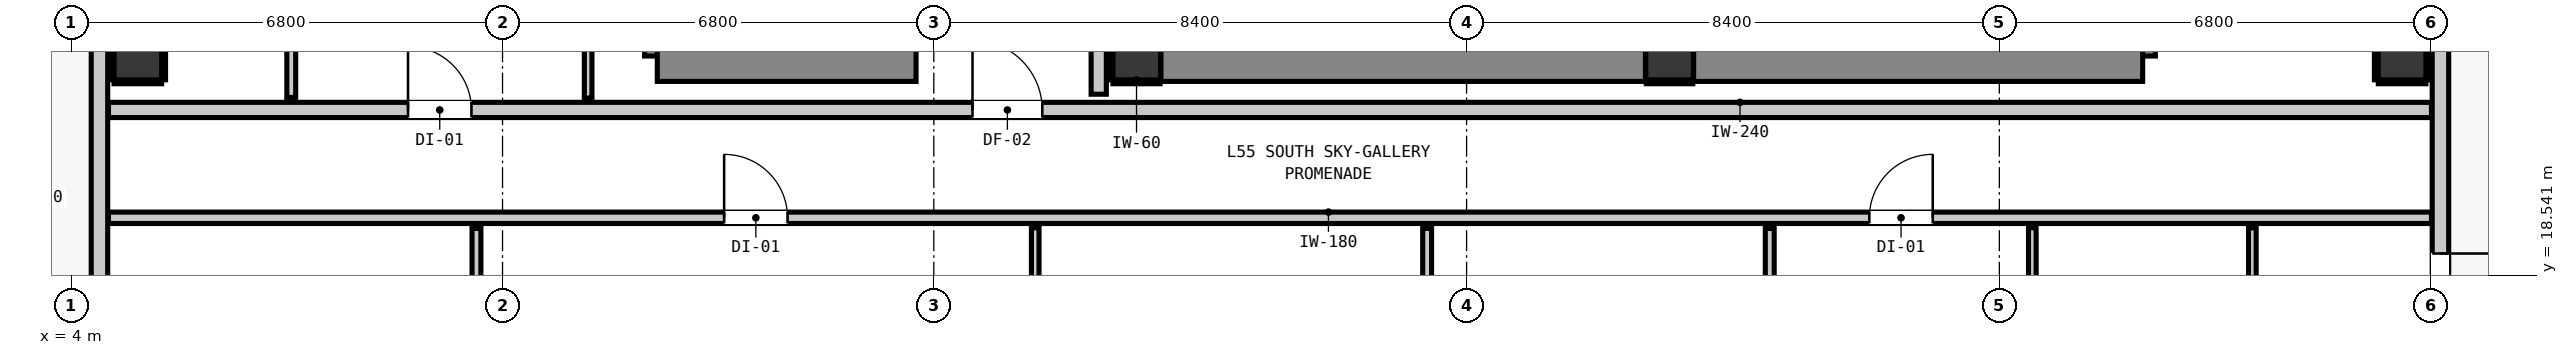
"""IFC4 building model, lengths in metres.
Left out: names, types, materials, properties, quantities, classifications, styles, units other than length and angle.
Written with IfcOpenShell. Run it as: python <this file> out.ifc"""

import sys

from ifc_helpers import new_model, si_unit, direction, frame, frame_2d, origin, origin_2d, place, context, subcontext, project, spatial, rectangle, extrude, element, fill, save


model = new_model("IFC4")
c1 = context("Model", 3, precision=1e-05, world=origin(), true_north=direction((0.0, 1.0)))
c2 = subcontext(c1, "Body", "Model", "MODEL_VIEW")
j1 = project(units=[si_unit("LENGTHUNIT", "METRE"), si_unit("PLANEANGLEUNIT", "RADIAN")], contexts=[c1])
p1 = place(None, origin())
s1 = spatial("IfcSite", under=j1, at=p1, CompositionType="ELEMENT")
p2 = place(p1, origin())
s2 = spatial("IfcBuilding", under=s1, at=p2, CompositionType="ELEMENT")
p3 = place(p2, frame((0.0, 0.0, 190.16)))
s3 = spatial("IfcBuildingStorey", under=s2, at=p3, CompositionType="ELEMENT", Elevation=190.16)
for number, where, z_axis, x_axis in (
    (1, (20.8, 22.0, 0.0), (0.0, 0.0, 1.0), (1.0, 0.0, 0.0)),
    (2, (29.2, 22.0, 0.0), (0.0, 0.0, 1.0), (1.0, 0.0, 0.0)),
):
    element("IfcColumn", number, at=place(p3, frame(where, z_axis=z_axis, x_axis=x_axis)), inside=s3, PredefinedType="COLUMN", context=c2, shape_type="SweptSolid", body=[
        extrude(rectangle(XDim=0.75, YDim=0.75, at=origin_2d()), origin(), (0.0, 0.0, 1.0), 3.32),
    ])
p4 = place(p3, frame((13.44, 22.0, 0.0), z_axis=(0.0, 0.0, 1.0), x_axis=(0.0, 1.0, 0.0)))
e3 = element("IfcWall", 3, at=p4, inside=s3, PredefinedType="SHEAR", context=c2, shape_type="SweptSolid", body=[
    extrude(rectangle(XDim=8.32, YDim=0.8, at=frame_2d((4.16, 0.0))), origin(), (0.0, 0.0, 1.0), 3.32),
])
p5 = place(p3, frame((13.24, 22.0, 0.0), z_axis=(0.0, 0.0, 1.0), x_axis=(1.0, 0.0, 0.0)))
e4 = element("IfcWall", 4, at=p5, inside=s3, PredefinedType="SHEAR", context=c2, shape_type="SweptSolid", body=[
    extrude(rectangle(XDim=4.08, YDim=0.8, at=frame_2d((2.04, 0.0))), origin(), (0.0, 0.0, 1.0), 3.32),
])
p6 = place(p3, frame((36.46, 22.0, 0.0), z_axis=(0.0, 0.0, 1.0), x_axis=(0.0, 1.0, 0.0)))
e5 = element("IfcWall", 5, at=p6, inside=s3, PredefinedType="SHEAR", context=c2, shape_type="SweptSolid", body=[
    extrude(rectangle(XDim=8.32, YDim=0.8, at=frame_2d((4.16, 0.0))), origin(), (0.0, 0.0, 1.0), 3.32),
])
p7 = place(p3, frame((29.58, 22.0, 0.0), z_axis=(0.0, 0.0, 1.0), x_axis=(1.0, 0.0, 0.0)))
e6 = element("IfcWall", 6, at=p7, inside=s3, PredefinedType="SHEAR", context=c2, shape_type="SweptSolid", body=[
    extrude(rectangle(XDim=7.08, YDim=0.8, at=frame_2d((3.54, 0.0))), origin(), (0.0, 0.0, 1.0), 3.32),
])
p8 = place(p3, frame((21.18, 22.0, 0.0), z_axis=(0.0, 0.0, 1.0), x_axis=(1.0, 0.0, 0.0)))
e7 = element("IfcWall", 7, at=p8, inside=s3, PredefinedType="SHEAR", context=c2, shape_type="SweptSolid", body=[
    extrude(rectangle(XDim=7.64, YDim=0.8, at=frame_2d((3.82, 0.0))), origin(), (0.0, 0.0, 1.0), 3.32),
])
for number, where, z_axis, x_axis in (
    (8, (5.05, 22.0, -0.2), (0.0, 0.0, 1.0), (1.0, 0.0, 0.0)),
    (9, (40.75, 22.0, -0.2), (0.0, 0.0, 1.0), (1.0, 0.0, 0.0)),
):
    element("IfcColumn", number, at=place(p3, frame(where, z_axis=z_axis, x_axis=x_axis)), inside=s3, PredefinedType="COLUMN", context=c2, shape_type="SweptSolid", body=[
        extrude(rectangle(XDim=0.75, YDim=0.75, at=origin_2d()), origin(), (0.0, 0.0, 1.0), 3.52),
    ])
p9 = place(p3, frame((4.445, 12.345, 0.0), z_axis=(0.0, 0.0, 1.0), x_axis=(0.0, 1.0, 0.0)))
e10 = element("IfcWall", 10, at=p9, inside=s3, PredefinedType="STANDARD", context=c2, shape_type="SweptSolid", body=[
    extrude(rectangle(XDim=30.31, YDim=0.26, at=frame_2d((15.155, 0.0))), origin(), (0.0, 0.0, 1.0), 3.1),
])
p10 = place(p9, frame((10.728, 0.0, 0.0)))
e11 = element("IfcOpeningElement", 11, at=p10, cuts=e10, PredefinedType="OPENING", context=c2, shape_type="SweptSolid", body=[
    extrude(rectangle(XDim=1.1, YDim=2.15, at=frame_2d((0.55, 1.075))), frame((0.0, 0.14, 0.0), z_axis=(0.0, -1.0, 0.0), x_axis=(1.0, 0.0, 0.0)), (0.0, 0.0, 1.0), 0.28),
])
p11 = place(p9, frame((0.252, 0.0, 0.85)))
e12 = element("IfcOpeningElement", 12, at=p11, cuts=e10, PredefinedType="OPENING", context=c2, shape_type="SweptSolid", body=[
    extrude(rectangle(XDim=2.7, YDim=2.0, at=frame_2d((1.35, 1.0))), frame((0.0, 0.14, 0.0), z_axis=(0.0, -1.0, 0.0), x_axis=(1.0, 0.0, 0.0)), (0.0, 0.0, 1.0), 0.28),
])
p12 = place(p3, frame((41.355, 42.655, 0.0), z_axis=(0.0, 0.0, 1.0), x_axis=(0.0, -1.0, 0.0)))
e13 = element("IfcWall", 13, at=p12, inside=s3, PredefinedType="STANDARD", context=c2, shape_type="SweptSolid", body=[
    extrude(rectangle(XDim=30.31, YDim=0.26, at=frame_2d((15.155, 0.0))), origin(), (0.0, 0.0, 1.0), 3.1),
])
p13 = place(p12, frame((23.768, 0.0, 0.0)))
e14 = element("IfcOpeningElement", 14, at=p13, cuts=e13, PredefinedType="OPENING", context=c2, shape_type="SweptSolid", body=[
    extrude(rectangle(XDim=1.1, YDim=2.15, at=frame_2d((0.55, 1.075))), frame((0.0, 0.14, 0.0), z_axis=(0.0, -1.0, 0.0), x_axis=(1.0, 0.0, 0.0)), (0.0, 0.0, 1.0), 0.28),
])
p14 = place(p12, frame((25.507, 0.0, 0.85)))
e15 = element("IfcOpeningElement", 15, at=p14, cuts=e13, PredefinedType="OPENING", context=c2, shape_type="SweptSolid", body=[
    extrude(rectangle(XDim=1.05, YDim=1.65, at=frame_2d((0.525, 0.825))), frame((0.0, 0.14, 0.0), z_axis=(0.0, -1.0, 0.0), x_axis=(1.0, 0.0, 0.0)), (0.0, 0.0, 1.0), 0.28),
])
p15 = place(p12, frame((27.358, 0.0, 0.85)))
e16 = element("IfcOpeningElement", 16, at=p15, cuts=e13, PredefinedType="OPENING", context=c2, shape_type="SweptSolid", body=[
    extrude(rectangle(XDim=2.7, YDim=2.0, at=frame_2d((1.35, 1.0))), frame((0.0, 0.14, 0.0), z_axis=(0.0, -1.0, 0.0), x_axis=(1.0, 0.0, 0.0)), (0.0, 0.0, 1.0), 0.28),
])
p16 = place(p3, frame((4.587, 21.15, 0.0), z_axis=(0.0, 0.0, 1.0), x_axis=(1.0, 0.0, 0.0)))
e17 = element("IfcWall", 17, at=p16, inside=s3, PredefinedType="PARTITIONING", context=c2, shape_type="SweptSolid", body=[
    extrude(rectangle(XDim=36.626, YDim=0.24, at=frame_2d((18.313, 0.0))), origin(), (0.0, 0.0, 1.0), 3.1),
])
p17 = place(p16, frame((13.623, 0.0, 0.0)))
e18 = element("IfcOpeningElement", 18, at=p17, cuts=e17, PredefinedType="OPENING", context=c2, shape_type="SweptSolid", body=[
    extrude(rectangle(XDim=1.1, YDim=2.15, at=frame_2d((0.55, 1.075))), frame((0.0, 0.13, 0.0), z_axis=(0.0, -1.0, 0.0), x_axis=(1.0, 0.0, 0.0)), (0.0, 0.0, 1.0), 0.26),
])
p18 = place(p16, frame((4.723, 0.0, 0.0)))
e19 = element("IfcOpeningElement", 19, at=p18, cuts=e17, PredefinedType="OPENING", context=c2, shape_type="SweptSolid", body=[
    extrude(rectangle(XDim=1.0, YDim=2.15, at=frame_2d((0.5, 1.075))), frame((0.0, 0.13, 0.0), z_axis=(0.0, -1.0, 0.0), x_axis=(1.0, 0.0, 0.0)), (0.0, 0.0, 1.0), 0.26),
])
p19 = place(p3, frame((4.587, 19.45, 0.0), z_axis=(0.0, 0.0, 1.0), x_axis=(1.0, 0.0, 0.0)))
e20 = element("IfcWall", 20, at=p19, inside=s3, PredefinedType="PARTITIONING", context=c2, shape_type="SweptSolid", body=[
    extrude(rectangle(XDim=36.626, YDim=0.18, at=frame_2d((18.313, 0.0))), origin(), (0.0, 0.0, 1.0), 3.1),
])
p20 = place(p19, frame((9.707, 0.0, 0.0)))
e21 = element("IfcOpeningElement", 21, at=p20, cuts=e20, PredefinedType="OPENING", context=c2, shape_type="SweptSolid", body=[
    extrude(rectangle(XDim=1.0, YDim=2.15, at=frame_2d((0.5, 1.075))), frame((0.0, 0.1, 0.0), z_axis=(0.0, -1.0, 0.0), x_axis=(1.0, 0.0, 0.0)), (0.0, 0.0, 1.0), 0.2),
])
p21 = place(p19, frame((27.763, 0.0, 0.0)))
e22 = element("IfcOpeningElement", 22, at=p21, cuts=e20, PredefinedType="OPENING", context=c2, shape_type="SweptSolid", body=[
    extrude(rectangle(XDim=1.0, YDim=2.15, at=frame_2d((0.5, 1.075))), frame((0.0, 0.1, 0.0), z_axis=(0.0, -1.0, 0.0), x_axis=(1.0, 0.0, 0.0)), (0.0, 0.0, 1.0), 0.2),
])
p22 = place(p3, frame((20.2, 21.398, 0.0), z_axis=(0.0, 0.0, 1.0), x_axis=(0.0, 1.0, 0.0)))
e23 = element("IfcWall", 23, at=p22, inside=s3, PredefinedType="PARTITIONING", context=c2, shape_type="SweptSolid", body=[
    extrude(rectangle(XDim=6.754, YDim=0.24, at=frame_2d((3.377, 0.0))), origin(), (0.0, 0.0, 1.0), 3.1),
])
p23 = place(p3, frame((7.469, 21.348, 0.0), z_axis=(0.0, 0.0, 1.0), x_axis=(0.0, 1.0, 0.0)))
e24 = element("IfcWall", 24, at=p23, inside=s3, PredefinedType="PARTITIONING", context=c2, shape_type="SweptSolid", body=[
    extrude(rectangle(XDim=4.804, YDim=0.14, at=frame_2d((2.402, 0.0))), origin(), (0.0, 0.0, 1.0), 3.1),
])
p24 = place(p23, frame((1.94, 0.0, 0.0)))
e25 = element("IfcOpeningElement", 25, at=p24, cuts=e24, PredefinedType="OPENING", context=c2, shape_type="SweptSolid", body=[
    extrude(rectangle(XDim=0.9, YDim=2.1, at=frame_2d((0.45, 1.05))), frame((0.0, 0.08, 0.0), z_axis=(0.0, -1.0, 0.0), x_axis=(1.0, 0.0, 0.0)), (0.0, 0.0, 1.0), 0.16),
])
p25 = place(p3, frame((10.389, 15.707, 0.0), z_axis=(0.0, 0.0, 1.0), x_axis=(0.0, 1.0, 0.0)))
e26 = element("IfcWall", 26, at=p25, inside=s3, PredefinedType="PARTITIONING", context=c2, shape_type="SweptSolid", body=[
    extrude(rectangle(XDim=3.575, YDim=0.14, at=frame_2d((1.788, 0.0))), origin(), (0.0, 0.0, 1.0), 3.1),
])
p26 = place(p25, frame((1.355, 0.0, 0.0)))
e27 = element("IfcOpeningElement", 27, at=p26, cuts=e26, PredefinedType="OPENING", context=c2, shape_type="SweptSolid", body=[
    extrude(rectangle(XDim=0.86, YDim=2.02, at=frame_2d((0.43, 1.01))), frame((0.0, 0.08, 0.0), z_axis=(0.0, -1.0, 0.0), x_axis=(1.0, 0.0, 0.0)), (0.0, 0.0, 1.0), 0.16),
])
p27 = place(p3, frame((25.378, 15.707, 0.0), z_axis=(0.0, 0.0, 1.0), x_axis=(0.0, 1.0, 0.0)))
e28 = element("IfcWall", 28, at=p27, inside=s3, PredefinedType="PARTITIONING", context=c2, shape_type="SweptSolid", body=[
    extrude(rectangle(XDim=3.575, YDim=0.14, at=frame_2d((1.788, 0.0))), origin(), (0.0, 0.0, 1.0), 3.1),
])
p28 = place(p3, frame((30.78, 15.707, 0.0), z_axis=(0.0, 0.0, 1.0), x_axis=(0.0, 1.0, 0.0)))
e29 = element("IfcWall", 29, at=p28, inside=s3, PredefinedType="PARTITIONING", context=c2, shape_type="SweptSolid", body=[
    extrude(rectangle(XDim=3.575, YDim=0.14, at=frame_2d((1.788, 0.0))), origin(), (0.0, 0.0, 1.0), 3.1),
])
p29 = place(p28, frame((1.355, 0.0, 0.0)))
e30 = element("IfcOpeningElement", 30, at=p29, cuts=e29, PredefinedType="OPENING", context=c2, shape_type="SweptSolid", body=[
    extrude(rectangle(XDim=0.86, YDim=2.02, at=frame_2d((0.43, 1.01))), frame((0.0, 0.08, 0.0), z_axis=(0.0, -1.0, 0.0), x_axis=(1.0, 0.0, 0.0)), (0.0, 0.0, 1.0), 0.16),
])
p30 = place(p3, frame((12.15, 21.338, 0.0), z_axis=(0.0, 0.0, 1.0), x_axis=(0.0, 1.0, 0.0)))
e31 = element("IfcWall", 31, at=p30, inside=s3, PredefinedType="PARTITIONING", context=c2, shape_type="SweptSolid", body=[
    extrude(rectangle(XDim=10.154, YDim=0.12, at=frame_2d((5.077, 0.0))), origin(), (0.0, 0.0, 1.0), 3.1),
])
p31 = place(p3, frame((19.199, 15.697, 0.0), z_axis=(0.0, 0.0, 1.0), x_axis=(0.0, 1.0, 0.0)))
e32 = element("IfcWall", 32, at=p31, inside=s3, PredefinedType="PARTITIONING", context=c2, shape_type="SweptSolid", body=[
    extrude(rectangle(XDim=3.595, YDim=0.12, at=frame_2d((1.797, 0.0))), origin(), (0.0, 0.0, 1.0), 3.1),
])
p32 = place(p31, frame((1.345, 0.0, 0.0)))
e33 = element("IfcOpeningElement", 33, at=p32, cuts=e32, PredefinedType="OPENING", context=c2, shape_type="SweptSolid", body=[
    extrude(rectangle(XDim=0.9, YDim=2.1, at=frame_2d((0.45, 1.05))), frame((0.0, 0.07, 0.0), z_axis=(0.0, -1.0, 0.0), x_axis=(1.0, 0.0, 0.0)), (0.0, 0.0, 1.0), 0.14),
])
p33 = place(p3, frame((34.92, 15.697, 0.0), z_axis=(0.0, 0.0, 1.0), x_axis=(0.0, 1.0, 0.0)))
e34 = element("IfcWall", 34, at=p33, inside=s3, PredefinedType="PARTITIONING", context=c2, shape_type="SweptSolid", body=[
    extrude(rectangle(XDim=3.595, YDim=0.12, at=frame_2d((1.797, 0.0))), origin(), (0.0, 0.0, 1.0), 3.1),
])
p34 = place(p33, frame((1.345, 0.0, 0.0)))
e35 = element("IfcOpeningElement", 35, at=p34, cuts=e34, PredefinedType="OPENING", context=c2, shape_type="SweptSolid", body=[
    extrude(rectangle(XDim=0.9, YDim=2.1, at=frame_2d((0.45, 1.05))), frame((0.0, 0.07, 0.0), z_axis=(0.0, -1.0, 0.0), x_axis=(1.0, 0.0, 0.0)), (0.0, 0.0, 1.0), 0.14),
])
p35 = place(p3, frame((38.389, 15.697, 0.0), z_axis=(0.0, 0.0, 1.0), x_axis=(0.0, 1.0, 0.0)))
e36 = element("IfcWall", 36, at=p35, inside=s3, PredefinedType="PARTITIONING", context=c2, shape_type="SweptSolid", body=[
    extrude(rectangle(XDim=3.595, YDim=0.12, at=frame_2d((1.797, 0.0))), origin(), (0.0, 0.0, 1.0), 2.477),
])
p36 = place(p35, frame((1.358, 0.0, 0.0)))
e37 = element("IfcOpeningElement", 37, at=p36, cuts=e36, PredefinedType="OPENING", context=c2, shape_type="SweptSolid", body=[
    extrude(rectangle(XDim=0.9, YDim=2.1, at=frame_2d((0.45, 1.05))), frame((0.0, 0.07, 0.0), z_axis=(0.0, -1.0, 0.0), x_axis=(1.0, 0.0, 0.0)), (0.0, 0.0, 1.0), 0.14),
])
p37 = place(p3, frame((20.425, 21.593, 0.0), z_axis=(0.0, 0.0, 1.0), x_axis=(1.0, 0.0, 0.0)))
e38 = element("IfcWall", 38, at=p37, inside=s3, PredefinedType="PARTITIONING", context=c2, shape_type="SweptSolid", body=[
    extrude(rectangle(XDim=0.742, YDim=0.06, at=frame_2d((0.371, 0.0))), origin(), (0.0, 0.0, 1.0), 1.45),
])
p38 = place(p3, frame((20.393, 21.625, 0.0), z_axis=(0.0, 0.0, 1.0), x_axis=(0.0, 1.0, 0.0)))
e39 = element("IfcWall", 39, at=p38, inside=s3, PredefinedType="PARTITIONING", context=c2, shape_type="SweptSolid", body=[
    extrude(rectangle(XDim=0.75, YDim=0.06, at=frame_2d((0.375, 0.0))), origin(), (0.0, 0.0, 1.0), 1.45),
])
p39 = place(p3, frame((28.833, 21.593, 0.0), z_axis=(0.0, 0.0, 1.0), x_axis=(1.0, 0.0, 0.0)))
e40 = element("IfcWall", 40, at=p39, inside=s3, PredefinedType="PARTITIONING", context=c2, shape_type="SweptSolid", body=[
    extrude(rectangle(XDim=0.734, YDim=0.06, at=frame_2d((0.367, 0.0))), origin(), (0.0, 0.0, 1.0), 1.45),
])
for number, where, z_axis, x_axis in (
    (41, (4.675, 21.593, 0.0), (0.0, 0.0, 1.0), (1.0, 0.0, 0.0)),
    (42, (4.643, 21.625, 0.0), (0.0, 0.0, 1.0), (0.0, 1.0, 0.0)),
    (43, (5.457, 21.625, 0.0), (0.0, 0.0, 1.0), (0.0, 1.0, 0.0)),
    (44, (40.375, 21.593, 0.0), (0.0, 0.0, 1.0), (1.0, 0.0, 0.0)),
    (45, (40.343, 21.625, 0.0), (0.0, 0.0, 1.0), (0.0, 1.0, 0.0)),
    (46, (41.157, 21.625, 0.0), (0.0, 0.0, 1.0), (0.0, 1.0, 0.0)),
):
    element("IfcWall", number, at=place(p3, frame(where, z_axis=z_axis, x_axis=x_axis)), inside=s3, PredefinedType="PARTITIONING", context=c2, shape_type="SweptSolid", body=[
        extrude(rectangle(XDim=0.75, YDim=0.06, at=frame_2d((0.375, 0.0))), origin(), (0.0, 0.0, 1.0), 1.45),
    ])
p40 = place(p13, origin())
e47 = element("IfcDoor", 47, at=p40, inside=s3, OperationType="SINGLE_SWING_LEFT", PredefinedType="DOOR", context=c2, shape_type="SweptSolid", body=[
    extrude(rectangle(XDim=1.1, YDim=2.15, at=frame_2d((0.55, 1.075))), frame((0.0, 0.025, 0.0), z_axis=(0.0, -1.0, 0.0), x_axis=(1.0, 0.0, 0.0)), (0.0, 0.0, 1.0), 0.05),
])
fill(e14, e47)
p41 = place(p17, origin())
e48 = element("IfcDoor", 48, at=p41, inside=s3, OperationType="SINGLE_SWING_LEFT", PredefinedType="DOOR", context=c2, shape_type="SweptSolid", body=[
    extrude(rectangle(XDim=1.1, YDim=2.15, at=frame_2d((0.55, 1.075))), frame((0.0, 0.025, 0.0), z_axis=(0.0, -1.0, 0.0), x_axis=(1.0, 0.0, 0.0)), (0.0, 0.0, 1.0), 0.05),
])
fill(e18, e48)
p42 = place(p20, origin())
e49 = element("IfcDoor", 49, at=p42, inside=s3, OperationType="SINGLE_SWING_LEFT", PredefinedType="DOOR", context=c2, shape_type="SweptSolid", body=[
    extrude(rectangle(XDim=1.0, YDim=2.15, at=frame_2d((0.5, 1.075))), frame((0.0, 0.025, 0.0), z_axis=(0.0, -1.0, 0.0), x_axis=(1.0, 0.0, 0.0)), (0.0, 0.0, 1.0), 0.05),
])
fill(e21, e49)
p43 = place(p21, origin())
e50 = element("IfcDoor", 50, at=p43, inside=s3, OperationType="SINGLE_SWING_RIGHT", PredefinedType="DOOR", context=c2, shape_type="SweptSolid", body=[
    extrude(rectangle(XDim=1.0, YDim=2.15, at=frame_2d((0.5, 1.075))), frame((0.0, 0.025, 0.0), z_axis=(0.0, -1.0, 0.0), x_axis=(1.0, 0.0, 0.0)), (0.0, 0.0, 1.0), 0.05),
])
fill(e22, e50)
p44 = place(p18, origin())
e51 = element("IfcDoor", 51, at=p44, inside=s3, OperationType="SINGLE_SWING_LEFT", PredefinedType="DOOR", context=c2, shape_type="SweptSolid", body=[
    extrude(rectangle(XDim=1.0, YDim=2.15, at=frame_2d((0.5, 1.075))), frame((0.0, 0.025, 0.0), z_axis=(0.0, -1.0, 0.0), x_axis=(1.0, 0.0, 0.0)), (0.0, 0.0, 1.0), 0.05),
])
fill(e19, e51)
save(model, sys.argv[1])
